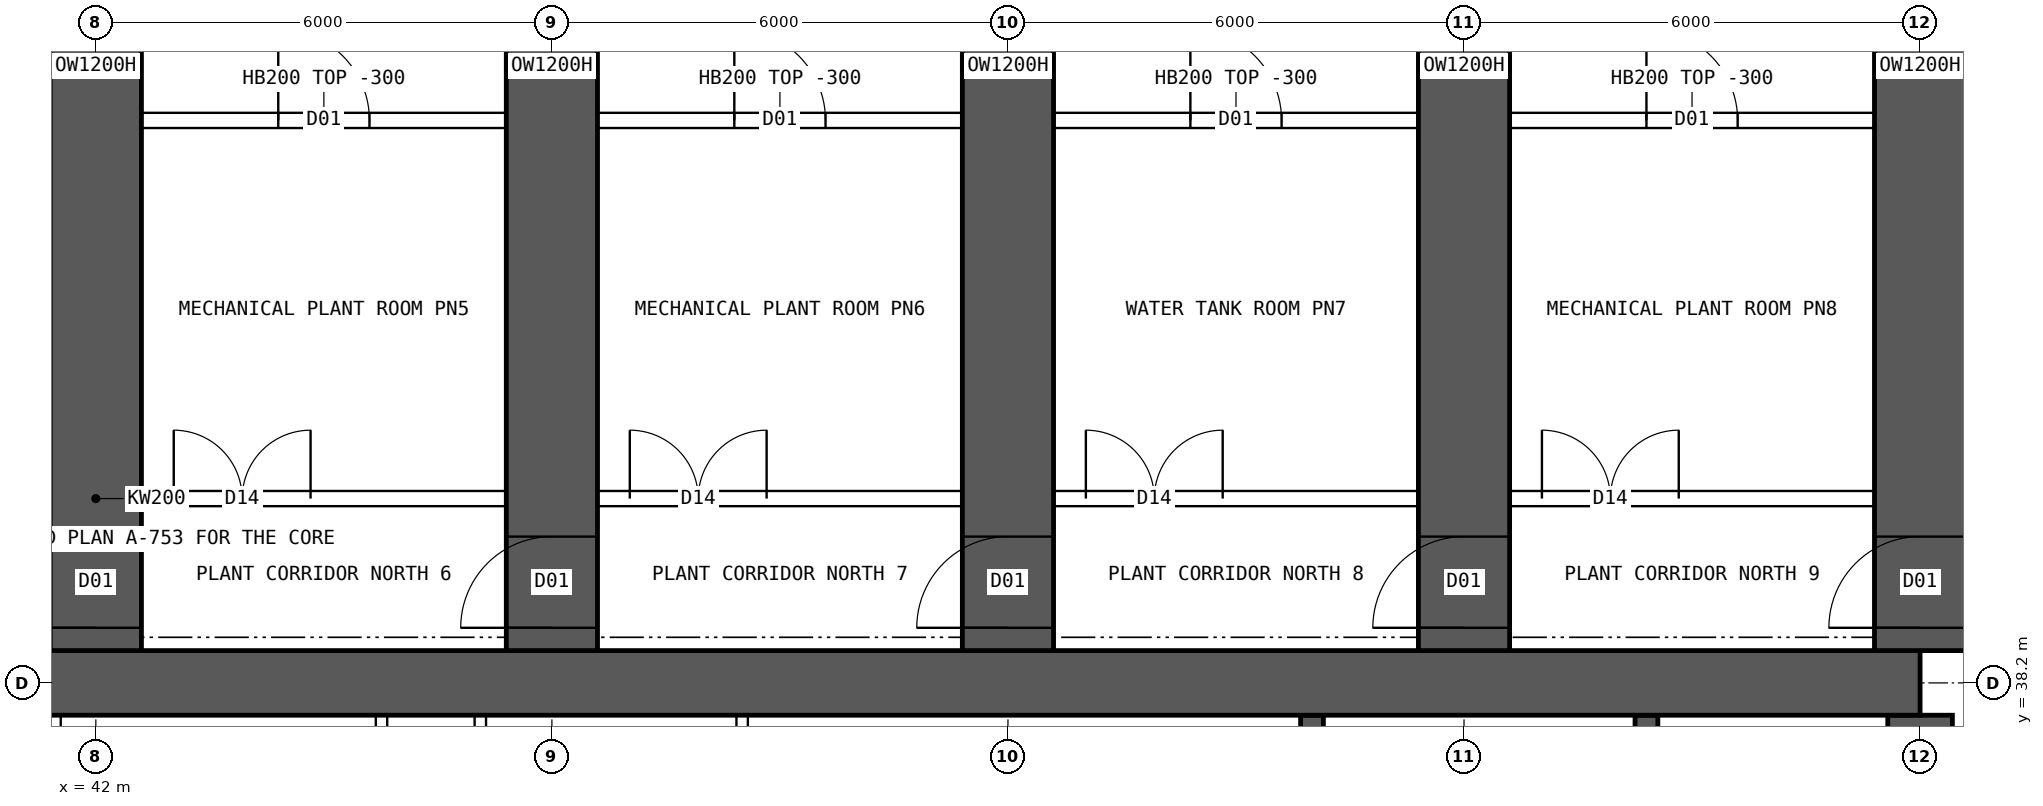
"""IFC4 building model, lengths in metres.
Left out: names, types, materials, properties, quantities, classifications, styles, units other than length and angle.
Written with IfcOpenShell. Run it as: python <this file> out.ifc"""

import sys

from ifc_helpers import new_model, si_unit, direction, frame, frame_2d, origin, place, context, subcontext, project, spatial, polyline, rectangle, outline, extrude, clip, halfspace, element, fill, save


model = new_model("IFC4")
c1 = context("Model", 3, precision=1e-05, world=origin(), true_north=direction((0.0, 1.0)))
c2 = subcontext(c1, "Body", "Model", "MODEL_VIEW")
j1 = project(units=[si_unit("LENGTHUNIT", "METRE"), si_unit("PLANEANGLEUNIT", "RADIAN")], contexts=[c1])
p1 = place(None, origin())
s1 = spatial("IfcSite", under=j1, at=p1, CompositionType="ELEMENT")
p2 = place(p1, origin())
s2 = spatial("IfcBuilding", under=s1, at=p2, CompositionType="ELEMENT")
p3 = place(p2, frame((0.0, 0.0, 201.1)))
s3 = spatial("IfcBuildingStorey", under=s2, at=p3, CompositionType="ELEMENT", Elevation=201.1)
p4 = place(p3, frame((18.0, 38.2, 0.0), z_axis=(0.0, 0.0, 1.0), x_axis=(1.0, 0.0, 0.0)))
e1 = element("IfcWall", 1, at=p4, inside=s3, PredefinedType="SHEAR", context=c2, shape_type="SweptSolid", body=[
    extrude(rectangle(XDim=48.0, YDim=0.85, at=frame_2d((24.0, 0.0))), origin(), (0.0, 0.0, 1.0), 7.2),
])
p5 = place(p3, frame((66.0, 26.225, 0.0), z_axis=(0.0, 0.0, 1.0), x_axis=(0.0, 1.0, 0.0)))
e2 = element("IfcWall", 2, at=p5, inside=s3, PredefinedType="SHEAR", context=c2, shape_type="SweptSolid", body=[
    extrude(rectangle(XDim=11.55, YDim=0.85, at=frame_2d((5.775, 0.0))), origin(), (0.0, 0.0, 1.0), 7.2),
])
p6 = place(p5, frame((5.075, 0.0, 0.0)))
e3 = element("IfcOpeningElement", 3, at=p6, cuts=e2, PredefinedType="OPENING", context=c2, shape_type="SweptSolid", body=[
    extrude(rectangle(XDim=1.2, YDim=2.1, at=frame_2d((0.6, 1.05))), frame((0.0, 0.435, 0.0), z_axis=(0.0, -1.0, 0.0), x_axis=(1.0, 0.0, 0.0)), (0.0, 0.0, 1.0), 0.87),
])
for number, where, z_axis, x_axis in (
    (4, (62.4, 34.75, 0.0), (0.0, 0.0, 1.0), (0.0, 1.0, 0.0)),
    (5, (58.0, 34.75, 0.0), (0.0, 0.0, 1.0), (0.0, 1.0, 0.0)),
):
    element("IfcWall", number, at=place(p3, frame(where, z_axis=z_axis, x_axis=x_axis)), inside=s3, PredefinedType="SHEAR", context=c2, shape_type="SweptSolid", body=[
        extrude(rectangle(XDim=3.025, YDim=0.3, at=frame_2d((1.512, 0.0))), origin(), (0.0, 0.0, 1.0), 7.2),
    ])
p7 = place(p3, frame((42.0, 38.625, 0.0), z_axis=(0.0, 0.0, 1.0), x_axis=(0.0, 1.0, 0.0)))
e6 = element("IfcWall", 6, at=p7, inside=s3, PredefinedType="SHEAR", context=c2, shape_type="SweptSolid", body=[
    extrude(rectangle(XDim=15.375, YDim=1.2, at=frame_2d((7.688, 0.0))), origin(), (0.0, 0.0, 1.0), 7.2),
])
p8 = place(p7, frame((0.3, 0.0, 0.0)))
e7 = element("IfcOpeningElement", 7, at=p8, cuts=e6, PredefinedType="OPENING", context=c2, shape_type="SweptSolid", body=[
    extrude(rectangle(XDim=1.2, YDim=2.1, at=frame_2d((0.6, 1.05))), frame((0.0, 0.61, 0.0), z_axis=(0.0, -1.0, 0.0), x_axis=(1.0, 0.0, 0.0)), (0.0, 0.0, 1.0), 1.22),
])
p9 = place(p3, frame((48.0, 38.625, 0.0), z_axis=(0.0, 0.0, 1.0), x_axis=(0.0, 1.0, 0.0)))
e8 = element("IfcWall", 8, at=p9, inside=s3, PredefinedType="SHEAR", context=c2, shape_type="SweptSolid", body=[
    extrude(rectangle(XDim=15.375, YDim=1.2, at=frame_2d((7.688, 0.0))), origin(), (0.0, 0.0, 1.0), 7.2),
])
p10 = place(p9, frame((0.3, 0.0, 0.0)))
e9 = element("IfcOpeningElement", 9, at=p10, cuts=e8, PredefinedType="OPENING", context=c2, shape_type="SweptSolid", body=[
    extrude(rectangle(XDim=1.2, YDim=2.1, at=frame_2d((0.6, 1.05))), frame((0.0, 0.61, 0.0), z_axis=(0.0, -1.0, 0.0), x_axis=(1.0, 0.0, 0.0)), (0.0, 0.0, 1.0), 1.22),
])
p11 = place(p3, frame((54.0, 38.625, 0.0), z_axis=(0.0, 0.0, 1.0), x_axis=(0.0, 1.0, 0.0)))
e10 = element("IfcWall", 10, at=p11, inside=s3, PredefinedType="SHEAR", context=c2, shape_type="SweptSolid", body=[
    extrude(rectangle(XDim=15.375, YDim=1.2, at=frame_2d((7.688, 0.0))), origin(), (0.0, 0.0, 1.0), 7.2),
])
p12 = place(p11, frame((0.3, 0.0, 0.0)))
e11 = element("IfcOpeningElement", 11, at=p12, cuts=e10, PredefinedType="OPENING", context=c2, shape_type="SweptSolid", body=[
    extrude(rectangle(XDim=1.2, YDim=2.1, at=frame_2d((0.6, 1.05))), frame((0.0, 0.61, 0.0), z_axis=(0.0, -1.0, 0.0), x_axis=(1.0, 0.0, 0.0)), (0.0, 0.0, 1.0), 1.22),
])
p13 = place(p3, frame((60.0, 38.625, 0.0), z_axis=(0.0, 0.0, 1.0), x_axis=(0.0, 1.0, 0.0)))
e12 = element("IfcWall", 12, at=p13, inside=s3, PredefinedType="SHEAR", context=c2, shape_type="SweptSolid", body=[
    extrude(rectangle(XDim=15.375, YDim=1.2, at=frame_2d((7.688, 0.0))), origin(), (0.0, 0.0, 1.0), 7.2),
])
p14 = place(p13, frame((0.3, 0.0, 0.0)))
e13 = element("IfcOpeningElement", 13, at=p14, cuts=e12, PredefinedType="OPENING", context=c2, shape_type="SweptSolid", body=[
    extrude(rectangle(XDim=1.2, YDim=2.1, at=frame_2d((0.6, 1.05))), frame((0.0, 0.61, 0.0), z_axis=(0.0, -1.0, 0.0), x_axis=(1.0, 0.0, 0.0)), (0.0, 0.0, 1.0), 1.22),
])
p15 = place(p3, frame((66.0, 38.625, 0.0), z_axis=(0.0, 0.0, 1.0), x_axis=(0.0, 1.0, 0.0)))
e14 = element("IfcWall", 14, at=p15, inside=s3, PredefinedType="SHEAR", context=c2, shape_type="SweptSolid", body=[
    extrude(rectangle(XDim=15.375, YDim=1.2, at=frame_2d((7.688, 0.0))), origin(), (0.0, 0.0, 1.0), 7.2),
])
p16 = place(p15, frame((0.3, 0.0, 0.0)))
e15 = element("IfcOpeningElement", 15, at=p16, cuts=e14, PredefinedType="OPENING", context=c2, shape_type="SweptSolid", body=[
    extrude(rectangle(XDim=1.2, YDim=2.1, at=frame_2d((0.6, 1.05))), frame((0.0, 0.61, 0.0), z_axis=(0.0, -1.0, 0.0), x_axis=(1.0, 0.0, 0.0)), (0.0, 0.0, 1.0), 1.22),
])
p17 = place(p15, frame((10.225, 0.0, 0.0)))
e16 = element("IfcOpeningElement", 16, at=p17, cuts=e14, PredefinedType="OPENING", context=c2, shape_type="SweptSolid", body=[
    extrude(rectangle(XDim=1.2, YDim=2.1, at=frame_2d((0.6, 1.05))), frame((0.0, 0.61, 0.0), z_axis=(0.0, -1.0, 0.0), x_axis=(1.0, 0.0, 0.0)), (0.0, 0.0, 1.0), 1.22),
])
for number, where, z_axis, x_axis in (
    (17, (41.463, 34.75, 0.0), (0.0, 0.0, 1.0), (0.0, 1.0, 0.0)),
    (18, (45.758, 34.75, 0.0), (0.0, 0.0, 1.0), (0.0, 1.0, 0.0)),
    (19, (47.058, 34.75, 0.0), (0.0, 0.0, 1.0), (0.0, 1.0, 0.0)),
    (20, (50.503, 34.75, 0.0), (0.0, 0.0, 1.0), (0.0, 1.0, 0.0)),
):
    element("IfcWall", number, at=place(p3, frame(where, z_axis=z_axis, x_axis=x_axis)), inside=s3, PredefinedType="SOLIDWALL", context=c2, shape_type="SweptSolid", body=[
        extrude(rectangle(XDim=3.025, YDim=0.15, at=frame_2d((1.512, 0.0))), origin(), (0.0, 0.0, 1.0), 6.9),
    ])
p18 = place(p3, frame((15.6, 40.625, 0.0), z_axis=(0.0, 0.0, 1.0), x_axis=(1.0, 0.0, 0.0)))
e21 = element("IfcWall", 21, at=p18, inside=s3, PredefinedType="SOLIDWALL", context=c2, shape_type="SweptSolid", body=[
    extrude(rectangle(XDim=52.8, YDim=0.2, at=frame_2d((26.4, 0.0))), origin(), (0.0, 0.0, 1.0), 6.9),
])
p19 = place(p18, frame((0.6, 0.0, 0.0)))
e22 = element("IfcOpeningElement", 22, at=p19, cuts=e21, PredefinedType="OPENING", context=c2, shape_type="SweptSolid", body=[
    extrude(rectangle(XDim=1.2, YDim=2.1, at=frame_2d((0.6, 1.05))), frame((0.0, 0.11, 0.0), z_axis=(0.0, -1.0, 0.0), x_axis=(1.0, 0.0, 0.0)), (0.0, 0.0, 1.0), 0.22),
])
p20 = place(p18, frame((3.425, 0.0, 0.0)))
e23 = element("IfcOpeningElement", 23, at=p20, cuts=e21, PredefinedType="OPENING", context=c2, shape_type="SweptSolid", body=[
    extrude(rectangle(XDim=1.8, YDim=2.4, at=frame_2d((0.9, 1.2))), frame((0.0, 0.11, 0.0), z_axis=(0.0, -1.0, 0.0), x_axis=(1.0, 0.0, 0.0)), (0.0, 0.0, 1.0), 0.22),
])
p21 = place(p18, frame((9.425, 0.0, 0.0)))
e24 = element("IfcOpeningElement", 24, at=p21, cuts=e21, PredefinedType="OPENING", context=c2, shape_type="SweptSolid", body=[
    extrude(rectangle(XDim=1.8, YDim=2.4, at=frame_2d((0.9, 1.2))), frame((0.0, 0.11, 0.0), z_axis=(0.0, -1.0, 0.0), x_axis=(1.0, 0.0, 0.0)), (0.0, 0.0, 1.0), 0.22),
])
p22 = place(p18, frame((15.425, 0.0, 0.0)))
e25 = element("IfcOpeningElement", 25, at=p22, cuts=e21, PredefinedType="OPENING", context=c2, shape_type="SweptSolid", body=[
    extrude(rectangle(XDim=1.8, YDim=2.4, at=frame_2d((0.9, 1.2))), frame((0.0, 0.11, 0.0), z_axis=(0.0, -1.0, 0.0), x_axis=(1.0, 0.0, 0.0)), (0.0, 0.0, 1.0), 0.22),
])
p23 = place(p18, frame((21.425, 0.0, 0.0)))
e26 = element("IfcOpeningElement", 26, at=p23, cuts=e21, PredefinedType="OPENING", context=c2, shape_type="SweptSolid", body=[
    extrude(rectangle(XDim=1.8, YDim=2.4, at=frame_2d((0.9, 1.2))), frame((0.0, 0.11, 0.0), z_axis=(0.0, -1.0, 0.0), x_axis=(1.0, 0.0, 0.0)), (0.0, 0.0, 1.0), 0.22),
])
p24 = place(p18, frame((27.425, 0.0, 0.0)))
e27 = element("IfcOpeningElement", 27, at=p24, cuts=e21, PredefinedType="OPENING", context=c2, shape_type="SweptSolid", body=[
    extrude(rectangle(XDim=1.8, YDim=2.4, at=frame_2d((0.9, 1.2))), frame((0.0, 0.11, 0.0), z_axis=(0.0, -1.0, 0.0), x_axis=(1.0, 0.0, 0.0)), (0.0, 0.0, 1.0), 0.22),
])
p25 = place(p18, frame((33.425, 0.0, 0.0)))
e28 = element("IfcOpeningElement", 28, at=p25, cuts=e21, PredefinedType="OPENING", context=c2, shape_type="SweptSolid", body=[
    extrude(rectangle(XDim=1.8, YDim=2.4, at=frame_2d((0.9, 1.2))), frame((0.0, 0.11, 0.0), z_axis=(0.0, -1.0, 0.0), x_axis=(1.0, 0.0, 0.0)), (0.0, 0.0, 1.0), 0.22),
])
p26 = place(p18, frame((39.425, 0.0, 0.0)))
e29 = element("IfcOpeningElement", 29, at=p26, cuts=e21, PredefinedType="OPENING", context=c2, shape_type="SweptSolid", body=[
    extrude(rectangle(XDim=1.8, YDim=2.4, at=frame_2d((0.9, 1.2))), frame((0.0, 0.11, 0.0), z_axis=(0.0, -1.0, 0.0), x_axis=(1.0, 0.0, 0.0)), (0.0, 0.0, 1.0), 0.22),
])
p27 = place(p18, frame((45.425, 0.0, 0.0)))
e30 = element("IfcOpeningElement", 30, at=p27, cuts=e21, PredefinedType="OPENING", context=c2, shape_type="SweptSolid", body=[
    extrude(rectangle(XDim=1.8, YDim=2.4, at=frame_2d((0.9, 1.2))), frame((0.0, 0.11, 0.0), z_axis=(0.0, -1.0, 0.0), x_axis=(1.0, 0.0, 0.0)), (0.0, 0.0, 1.0), 0.22),
])
p28 = place(p18, frame((51.425, 0.0, 0.0)))
e31 = element("IfcOpeningElement", 31, at=p28, cuts=e21, PredefinedType="OPENING", context=c2, shape_type="SweptSolid", body=[
    extrude(rectangle(XDim=1.2, YDim=2.1, at=frame_2d((0.6, 1.05))), frame((0.0, 0.11, 0.0), z_axis=(0.0, -1.0, 0.0), x_axis=(1.0, 0.0, 0.0)), (0.0, 0.0, 1.0), 0.22),
])
p29 = place(p3, frame((36.425, 45.6, 0.0), z_axis=(0.0, 0.0, 1.0), x_axis=(1.0, 0.0, 0.0)))
e32 = element("IfcWall", 32, at=p29, inside=s3, PredefinedType="SOLIDWALL", context=c2, shape_type="SweptSolid", body=[
    extrude(rectangle(XDim=5.15, YDim=0.2, at=frame_2d((2.575, 0.0))), origin(), (0.0, 0.0, 1.0), 6.9),
])
p30 = place(p29, frame((1.975, 0.0, 0.0)))
e33 = element("IfcOpeningElement", 33, at=p30, cuts=e32, PredefinedType="OPENING", context=c2, shape_type="SweptSolid", body=[
    extrude(rectangle(XDim=1.2, YDim=2.1, at=frame_2d((0.6, 1.05))), frame((0.0, 0.11, 0.0), z_axis=(0.0, -1.0, 0.0), x_axis=(1.0, 0.0, 0.0)), (0.0, 0.0, 1.0), 0.22),
])
p31 = place(p3, frame((42.425, 45.6, 0.0), z_axis=(0.0, 0.0, 1.0), x_axis=(1.0, 0.0, 0.0)))
e34 = element("IfcWall", 34, at=p31, inside=s3, PredefinedType="SOLIDWALL", context=c2, shape_type="SweptSolid", body=[
    extrude(rectangle(XDim=5.15, YDim=0.2, at=frame_2d((2.575, 0.0))), origin(), (0.0, 0.0, 1.0), 6.9),
])
p32 = place(p31, frame((1.975, 0.0, 0.0)))
e35 = element("IfcOpeningElement", 35, at=p32, cuts=e34, PredefinedType="OPENING", context=c2, shape_type="SweptSolid", body=[
    extrude(rectangle(XDim=1.2, YDim=2.1, at=frame_2d((0.6, 1.05))), frame((0.0, 0.11, 0.0), z_axis=(0.0, -1.0, 0.0), x_axis=(1.0, 0.0, 0.0)), (0.0, 0.0, 1.0), 0.22),
])
p33 = place(p3, frame((48.425, 45.6, 0.0), z_axis=(0.0, 0.0, 1.0), x_axis=(1.0, 0.0, 0.0)))
e36 = element("IfcWall", 36, at=p33, inside=s3, PredefinedType="SOLIDWALL", context=c2, shape_type="SweptSolid", body=[
    extrude(rectangle(XDim=5.15, YDim=0.2, at=frame_2d((2.575, 0.0))), origin(), (0.0, 0.0, 1.0), 6.9),
])
p34 = place(p33, frame((1.975, 0.0, 0.0)))
e37 = element("IfcOpeningElement", 37, at=p34, cuts=e36, PredefinedType="OPENING", context=c2, shape_type="SweptSolid", body=[
    extrude(rectangle(XDim=1.2, YDim=2.1, at=frame_2d((0.6, 1.05))), frame((0.0, 0.11, 0.0), z_axis=(0.0, -1.0, 0.0), x_axis=(1.0, 0.0, 0.0)), (0.0, 0.0, 1.0), 0.22),
])
p35 = place(p3, frame((54.425, 45.6, 0.0), z_axis=(0.0, 0.0, 1.0), x_axis=(1.0, 0.0, 0.0)))
e38 = element("IfcWall", 38, at=p35, inside=s3, PredefinedType="SOLIDWALL", context=c2, shape_type="SweptSolid", body=[
    extrude(rectangle(XDim=5.15, YDim=0.2, at=frame_2d((2.575, 0.0))), origin(), (0.0, 0.0, 1.0), 6.9),
])
p36 = place(p35, frame((1.975, 0.0, 0.0)))
e39 = element("IfcOpeningElement", 39, at=p36, cuts=e38, PredefinedType="OPENING", context=c2, shape_type="SweptSolid", body=[
    extrude(rectangle(XDim=1.2, YDim=2.1, at=frame_2d((0.6, 1.05))), frame((0.0, 0.11, 0.0), z_axis=(0.0, -1.0, 0.0), x_axis=(1.0, 0.0, 0.0)), (0.0, 0.0, 1.0), 0.22),
])
p37 = place(p3, frame((60.425, 45.6, 0.0), z_axis=(0.0, 0.0, 1.0), x_axis=(1.0, 0.0, 0.0)))
e40 = element("IfcWall", 40, at=p37, inside=s3, PredefinedType="SOLIDWALL", context=c2, shape_type="SweptSolid", body=[
    extrude(rectangle(XDim=5.15, YDim=0.2, at=frame_2d((2.575, 0.0))), origin(), (0.0, 0.0, 1.0), 6.9),
])
p38 = place(p37, frame((1.975, 0.0, 0.0)))
e41 = element("IfcOpeningElement", 41, at=p38, cuts=e40, PredefinedType="OPENING", context=c2, shape_type="SweptSolid", body=[
    extrude(rectangle(XDim=1.2, YDim=2.1, at=frame_2d((0.6, 1.05))), frame((0.0, 0.11, 0.0), z_axis=(0.0, -1.0, 0.0), x_axis=(1.0, 0.0, 0.0)), (0.0, 0.0, 1.0), 0.22),
])
p39 = place(p3, frame((66.425, 45.6, 0.0), z_axis=(0.0, 0.0, 1.0), x_axis=(1.0, 0.0, 0.0)))
e42 = element("IfcWall", 42, at=p39, inside=s3, PredefinedType="SOLIDWALL", context=c2, shape_type="Clipping", body=[
    clip(clip(extrude(outline(polyline([(-0.03, 0.0), (8.857, 0.0), (8.857, 6.9), (5.877, 6.9), (5.875, 6.45), (5.277, 6.45), (5.275, 6.9), (-0.03, 6.9), (-0.03, 0.0)])), frame((0.0, 0.1, 0.0), z_axis=(0.0, -1.0, 0.0), x_axis=(1.0, 0.0, 0.0)), (0.0, 0.0, 1.0), 0.2), halfspace(frame((0.0, 0.0, 0.0), z_axis=(-1.0, 0.0, 0.0)), False)), halfspace(frame((8.827, 0.0, 0.0), z_axis=(0.980787601265, 0.195078653892, 0.0)), False)),
])
p40 = place(p39, frame((3.812, 0.0, 0.0)))
e43 = element("IfcOpeningElement", 43, at=p40, cuts=e42, PredefinedType="OPENING", context=c2, shape_type="SweptSolid", body=[
    extrude(rectangle(XDim=1.2, YDim=2.1, at=frame_2d((0.6, 1.05))), frame((0.0, 0.11, 0.0), z_axis=(0.0, -1.0, 0.0), x_axis=(1.0, 0.0, 0.0)), (0.0, 0.0, 1.0), 0.22),
])
p41 = place(p32, origin())
e44 = element("IfcDoor", 44, at=p41, inside=s3, OperationType="SINGLE_SWING_LEFT", PredefinedType="DOOR", context=c2, shape_type="SweptSolid", body=[
    extrude(rectangle(XDim=1.2, YDim=2.1, at=frame_2d((0.6, 1.05))), frame((0.0, 0.025, 0.0), z_axis=(0.0, -1.0, 0.0), x_axis=(1.0, 0.0, 0.0)), (0.0, 0.0, 1.0), 0.05),
])
fill(e35, e44)
p42 = place(p34, origin())
e45 = element("IfcDoor", 45, at=p42, inside=s3, OperationType="SINGLE_SWING_LEFT", PredefinedType="DOOR", context=c2, shape_type="SweptSolid", body=[
    extrude(rectangle(XDim=1.2, YDim=2.1, at=frame_2d((0.6, 1.05))), frame((0.0, 0.025, 0.0), z_axis=(0.0, -1.0, 0.0), x_axis=(1.0, 0.0, 0.0)), (0.0, 0.0, 1.0), 0.05),
])
fill(e37, e45)
p43 = place(p36, origin())
e46 = element("IfcDoor", 46, at=p43, inside=s3, OperationType="SINGLE_SWING_LEFT", PredefinedType="DOOR", context=c2, shape_type="SweptSolid", body=[
    extrude(rectangle(XDim=1.2, YDim=2.1, at=frame_2d((0.6, 1.05))), frame((0.0, 0.025, 0.0), z_axis=(0.0, -1.0, 0.0), x_axis=(1.0, 0.0, 0.0)), (0.0, 0.0, 1.0), 0.05),
])
fill(e39, e46)
p44 = place(p38, origin())
e47 = element("IfcDoor", 47, at=p44, inside=s3, OperationType="SINGLE_SWING_LEFT", PredefinedType="DOOR", context=c2, shape_type="SweptSolid", body=[
    extrude(rectangle(XDim=1.2, YDim=2.1, at=frame_2d((0.6, 1.05))), frame((0.0, 0.025, 0.0), z_axis=(0.0, -1.0, 0.0), x_axis=(1.0, 0.0, 0.0)), (0.0, 0.0, 1.0), 0.05),
])
fill(e41, e47)
p45 = place(p24, origin())
e48 = element("IfcDoor", 48, at=p45, inside=s3, OperationType="DOUBLE_DOOR_SINGLE_SWING", PredefinedType="DOOR", context=c2, shape_type="SweptSolid", body=[
    extrude(rectangle(XDim=1.8, YDim=2.4, at=frame_2d((0.9, 1.2))), frame((0.0, 0.025, 0.0), z_axis=(0.0, -1.0, 0.0), x_axis=(1.0, 0.0, 0.0)), (0.0, 0.0, 1.0), 0.05),
])
fill(e27, e48)
p46 = place(p25, origin())
e49 = element("IfcDoor", 49, at=p46, inside=s3, OperationType="DOUBLE_DOOR_SINGLE_SWING", PredefinedType="DOOR", context=c2, shape_type="SweptSolid", body=[
    extrude(rectangle(XDim=1.8, YDim=2.4, at=frame_2d((0.9, 1.2))), frame((0.0, 0.025, 0.0), z_axis=(0.0, -1.0, 0.0), x_axis=(1.0, 0.0, 0.0)), (0.0, 0.0, 1.0), 0.05),
])
fill(e28, e49)
p47 = place(p26, origin())
e50 = element("IfcDoor", 50, at=p47, inside=s3, OperationType="DOUBLE_DOOR_SINGLE_SWING", PredefinedType="DOOR", context=c2, shape_type="SweptSolid", body=[
    extrude(rectangle(XDim=1.8, YDim=2.4, at=frame_2d((0.9, 1.2))), frame((0.0, 0.025, 0.0), z_axis=(0.0, -1.0, 0.0), x_axis=(1.0, 0.0, 0.0)), (0.0, 0.0, 1.0), 0.05),
])
fill(e29, e50)
p48 = place(p27, origin())
e51 = element("IfcDoor", 51, at=p48, inside=s3, OperationType="DOUBLE_DOOR_SINGLE_SWING", PredefinedType="DOOR", context=c2, shape_type="SweptSolid", body=[
    extrude(rectangle(XDim=1.8, YDim=2.4, at=frame_2d((0.9, 1.2))), frame((0.0, 0.025, 0.0), z_axis=(0.0, -1.0, 0.0), x_axis=(1.0, 0.0, 0.0)), (0.0, 0.0, 1.0), 0.05),
])
fill(e30, e51)
p49 = place(p8, origin())
e52 = element("IfcDoor", 52, at=p49, inside=s3, OperationType="SINGLE_SWING_LEFT", PredefinedType="DOOR", context=c2, shape_type="SweptSolid", body=[
    extrude(rectangle(XDim=1.2, YDim=2.1, at=frame_2d((0.6, 1.05))), frame((0.0, 0.025, 0.0), z_axis=(0.0, -1.0, 0.0), x_axis=(1.0, 0.0, 0.0)), (0.0, 0.0, 1.0), 0.05),
])
fill(e7, e52)
p50 = place(p10, origin())
e53 = element("IfcDoor", 53, at=p50, inside=s3, OperationType="SINGLE_SWING_LEFT", PredefinedType="DOOR", context=c2, shape_type="SweptSolid", body=[
    extrude(rectangle(XDim=1.2, YDim=2.1, at=frame_2d((0.6, 1.05))), frame((0.0, 0.025, 0.0), z_axis=(0.0, -1.0, 0.0), x_axis=(1.0, 0.0, 0.0)), (0.0, 0.0, 1.0), 0.05),
])
fill(e9, e53)
p51 = place(p12, origin())
e54 = element("IfcDoor", 54, at=p51, inside=s3, OperationType="SINGLE_SWING_LEFT", PredefinedType="DOOR", context=c2, shape_type="SweptSolid", body=[
    extrude(rectangle(XDim=1.2, YDim=2.1, at=frame_2d((0.6, 1.05))), frame((0.0, 0.025, 0.0), z_axis=(0.0, -1.0, 0.0), x_axis=(1.0, 0.0, 0.0)), (0.0, 0.0, 1.0), 0.05),
])
fill(e11, e54)
p52 = place(p14, origin())
e55 = element("IfcDoor", 55, at=p52, inside=s3, OperationType="SINGLE_SWING_LEFT", PredefinedType="DOOR", context=c2, shape_type="SweptSolid", body=[
    extrude(rectangle(XDim=1.2, YDim=2.1, at=frame_2d((0.6, 1.05))), frame((0.0, 0.025, 0.0), z_axis=(0.0, -1.0, 0.0), x_axis=(1.0, 0.0, 0.0)), (0.0, 0.0, 1.0), 0.05),
])
fill(e13, e55)
p53 = place(p16, origin())
e56 = element("IfcDoor", 56, at=p53, inside=s3, OperationType="SINGLE_SWING_LEFT", PredefinedType="DOOR", context=c2, shape_type="SweptSolid", body=[
    extrude(rectangle(XDim=1.2, YDim=2.1, at=frame_2d((0.6, 1.05))), frame((0.0, 0.025, 0.0), z_axis=(0.0, -1.0, 0.0), x_axis=(1.0, 0.0, 0.0)), (0.0, 0.0, 1.0), 0.05),
])
fill(e15, e56)
save(model, sys.argv[1])
